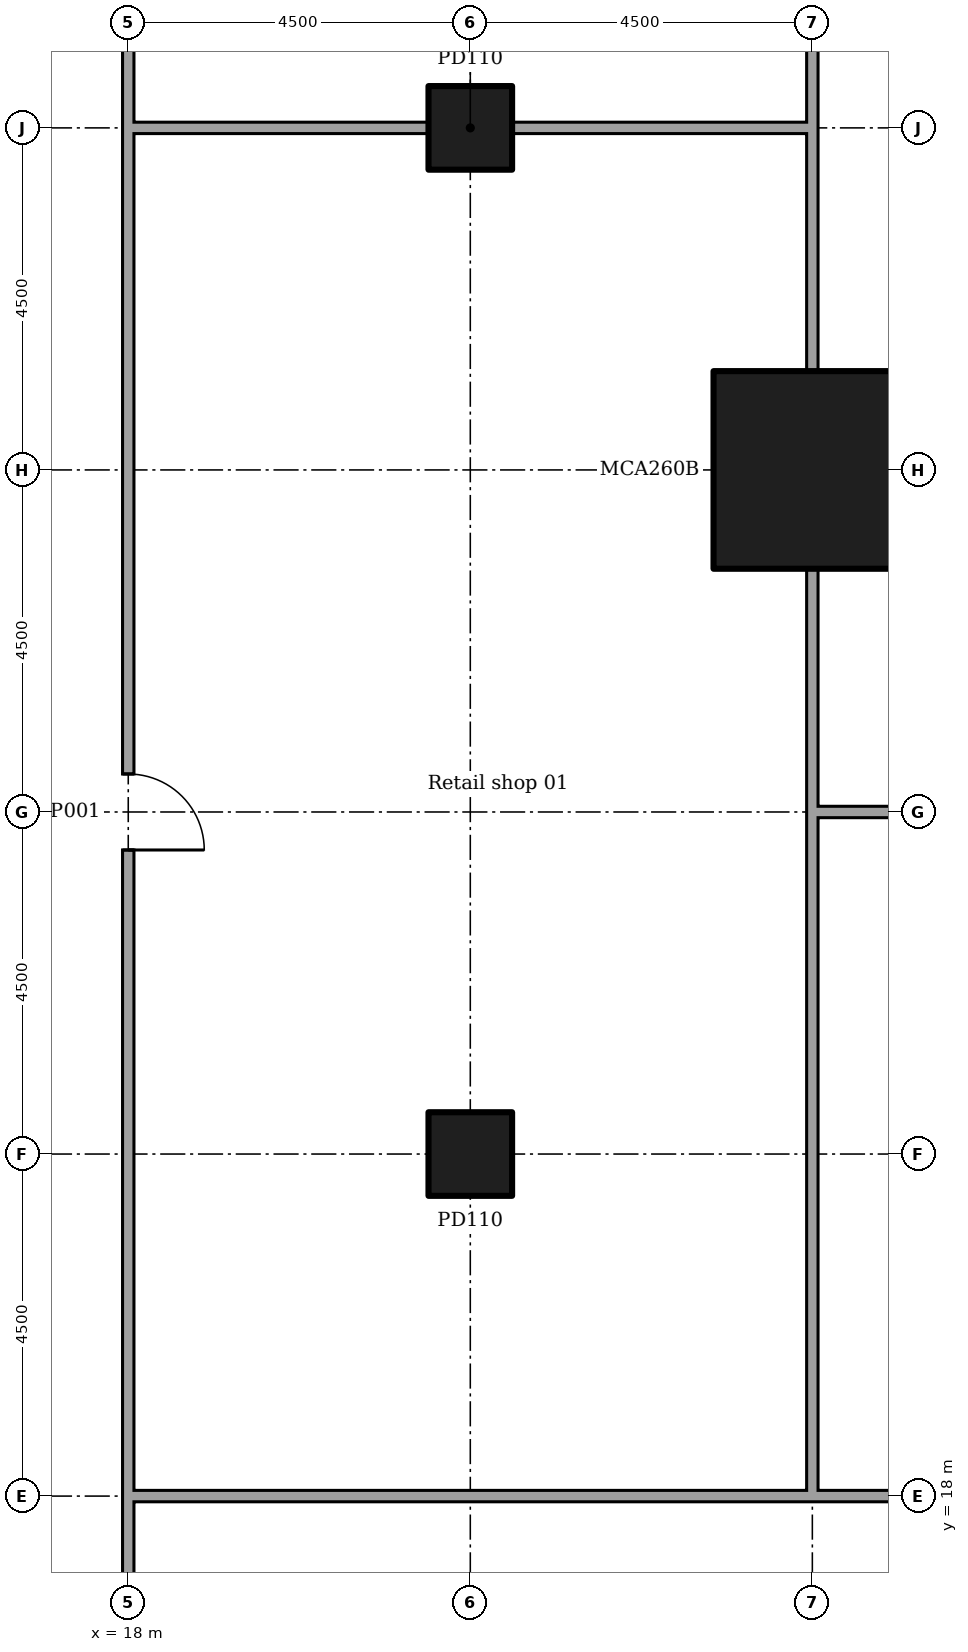
"""IFC4 building model, lengths in metres.
Left out: names, types, materials, properties, quantities, classifications, styles, units other than length and angle.
Written with IfcOpenShell. Run it as: python <this file> out.ifc"""

import sys

from ifc_helpers import new_model, si_unit, direction, frame, frame_2d, origin, origin_2d, place, context, subcontext, project, spatial, rectangle, extrude, element, fill, save


model = new_model("IFC4")
c1 = context("Model", 3, precision=1e-05, world=origin(), true_north=direction((0.0, 1.0)))
c2 = subcontext(c1, "Body", "Model", "MODEL_VIEW")
j1 = project(units=[si_unit("LENGTHUNIT", "METRE"), si_unit("PLANEANGLEUNIT", "RADIAN")], contexts=[c1])
p1 = place(None, origin())
s1 = spatial("IfcSite", under=j1, at=p1, CompositionType="ELEMENT")
p2 = place(p1, origin())
s2 = spatial("IfcBuilding", under=s1, at=p2, CompositionType="ELEMENT")
p3 = place(p2, frame((0.0, 0.0, 6.0)))
s3 = spatial("IfcBuildingStorey", under=s2, at=p3, CompositionType="ELEMENT", Elevation=6.0)
p4 = place(p3, frame((27.0, 31.5, 0.0)))
e1 = element("IfcColumn", 1, at=p4, inside=s3, PredefinedType="COLUMN", context=c2, shape_type="SweptSolid", body=[
    extrude(rectangle(XDim=2.6, YDim=2.6, at=origin_2d()), origin(), (0.0, 0.0, 1.0), 5.5),
])
for number, where in (
    (2, (22.5, 22.5, 0.0)),
    (3, (22.5, 36.0, 0.0)),
):
    element("IfcColumn", number, at=place(p3, frame(where)), inside=s3, PredefinedType="COLUMN", context=c2, shape_type="SweptSolid", body=[
        extrude(rectangle(XDim=1.1, YDim=1.1, at=origin_2d()), origin(), (0.0, 0.0, 1.0), 5.5),
    ])
p5 = place(p3, frame((18.0, 9.3, 0.0), z_axis=(0.0, 0.0, 1.0), x_axis=(0.0, 1.0, 0.0)))
e4 = element("IfcWall", 4, at=p5, inside=s3, PredefinedType="PARTITIONING", context=c2, shape_type="SweptSolid", body=[
    extrude(rectangle(XDim=8.775, YDim=0.15, at=frame_2d((4.387, 0.0))), origin(), (0.0, 0.0, 1.0), 5.05),
])
p6 = place(p5, frame((3.45, 0.0, 0.0)))
e5 = element("IfcOpeningElement", 5, at=p6, cuts=e4, PredefinedType="OPENING", context=c2, shape_type="SweptSolid", body=[
    extrude(rectangle(XDim=1.8, YDim=2.1, at=frame_2d((0.9, 1.05))), frame((0.0, 0.085, 0.0), z_axis=(0.0, -1.0, 0.0), x_axis=(1.0, 0.0, 0.0)), (0.0, 0.0, 1.0), 0.17),
])
p7 = place(p3, frame((18.0, 18.0, 0.0), z_axis=(0.0, 0.0, 1.0), x_axis=(0.0, 1.0, 0.0)))
e6 = element("IfcWall", 6, at=p7, inside=s3, PredefinedType="PARTITIONING", context=c2, shape_type="SweptSolid", body=[
    extrude(rectangle(XDim=18.075, YDim=0.15, at=frame_2d((9.038, 0.0))), origin(), (0.0, 0.0, 1.0), 5.05),
])
p8 = place(p7, frame((8.5, 0.0, 0.0)))
e7 = element("IfcOpeningElement", 7, at=p8, cuts=e6, PredefinedType="OPENING", context=c2, shape_type="SweptSolid", body=[
    extrude(rectangle(XDim=1.0, YDim=2.1, at=frame_2d((0.5, 1.05))), frame((0.0, 0.085, 0.0), z_axis=(0.0, -1.0, 0.0), x_axis=(1.0, 0.0, 0.0)), (0.0, 0.0, 1.0), 0.17),
])
p9 = place(p3, frame((18.0, 36.0, 0.0), z_axis=(0.0, 0.0, 1.0), x_axis=(0.0, 1.0, 0.0)))
e8 = element("IfcWall", 8, at=p9, inside=s3, PredefinedType="PARTITIONING", context=c2, shape_type="SweptSolid", body=[
    extrude(rectangle(XDim=18.075, YDim=0.15, at=frame_2d((9.038, 0.0))), origin(), (0.0, 0.0, 1.0), 5.05),
])
p10 = place(p9, frame((8.5, 0.0, 0.0)))
e9 = element("IfcOpeningElement", 9, at=p10, cuts=e8, PredefinedType="OPENING", context=c2, shape_type="SweptSolid", body=[
    extrude(rectangle(XDim=1.0, YDim=2.1, at=frame_2d((0.5, 1.05))), frame((0.0, 0.085, 0.0), z_axis=(0.0, -1.0, 0.0), x_axis=(1.0, 0.0, 0.0)), (0.0, 0.0, 1.0), 0.17),
])
p11 = place(p3, frame((18.075, 18.0, 0.0)))
e10 = element("IfcWall", 10, at=p11, inside=s3, PredefinedType="PARTITIONING", context=c2, shape_type="SweptSolid", body=[
    extrude(rectangle(XDim=9.0, YDim=0.15, at=frame_2d((4.5, 0.0))), origin(), (0.0, 0.0, 1.0), 5.05),
])
p12 = place(p3, frame((27.0, 18.0, 0.0)))
e11 = element("IfcWall", 11, at=p12, inside=s3, PredefinedType="PARTITIONING", context=c2, shape_type="SweptSolid", body=[
    extrude(rectangle(XDim=18.075, YDim=0.15, at=frame_2d((9.038, 0.0))), origin(), (0.0, 0.0, 1.0), 5.05),
])
p13 = place(p12, frame((8.5, 0.0, 0.0)))
e12 = element("IfcOpeningElement", 12, at=p13, cuts=e11, PredefinedType="OPENING", context=c2, shape_type="SweptSolid", body=[
    extrude(rectangle(XDim=1.0, YDim=2.1, at=frame_2d((0.5, 1.05))), frame((0.0, 0.085, 0.0), z_axis=(0.0, -1.0, 0.0), x_axis=(1.0, 0.0, 0.0)), (0.0, 0.0, 1.0), 0.17),
])
p14 = place(p3, frame((18.075, 36.0, 0.0)))
e13 = element("IfcWall", 13, at=p14, inside=s3, PredefinedType="PARTITIONING", context=c2, shape_type="SweptSolid", body=[
    extrude(rectangle(XDim=3.88, YDim=0.15, at=frame_2d((1.94, 0.0))), origin(), (0.0, 0.0, 1.0), 5.05),
])
p15 = place(p3, frame((23.045, 36.0, 0.0)))
e14 = element("IfcWall", 14, at=p15, inside=s3, PredefinedType="PARTITIONING", context=c2, shape_type="SweptSolid", body=[
    extrude(rectangle(XDim=4.03, YDim=0.15, at=frame_2d((2.015, 0.0))), origin(), (0.0, 0.0, 1.0), 5.05),
])
p16 = place(p3, frame((27.0, 18.075, 0.0), z_axis=(0.0, 0.0, 1.0), x_axis=(0.0, 1.0, 0.0)))
e15 = element("IfcWall", 15, at=p16, inside=s3, PredefinedType="PARTITIONING", context=c2, shape_type="SweptSolid", body=[
    extrude(rectangle(XDim=9.0, YDim=0.15, at=frame_2d((4.5, 0.0))), origin(), (0.0, 0.0, 1.0), 5.05),
])
p17 = place(p3, frame((27.0, 27.0, 0.0), z_axis=(0.0, 0.0, 1.0), x_axis=(0.0, 1.0, 0.0)))
e16 = element("IfcWall", 16, at=p17, inside=s3, PredefinedType="PARTITIONING", context=c2, shape_type="SweptSolid", body=[
    extrude(rectangle(XDim=3.205, YDim=0.15, at=frame_2d((1.603, 0.0))), origin(), (0.0, 0.0, 1.0), 5.05),
])
p18 = place(p3, frame((27.0, 32.795, 0.0), z_axis=(0.0, 0.0, 1.0), x_axis=(0.0, 1.0, 0.0)))
e17 = element("IfcWall", 17, at=p18, inside=s3, PredefinedType="PARTITIONING", context=c2, shape_type="SweptSolid", body=[
    extrude(rectangle(XDim=3.13, YDim=0.15, at=frame_2d((1.565, 0.0))), origin(), (0.0, 0.0, 1.0), 5.05),
])
p19 = place(p3, frame((27.0, 36.0, 0.0), z_axis=(0.0, 0.0, 1.0), x_axis=(0.0, 1.0, 0.0)))
e18 = element("IfcWall", 18, at=p19, inside=s3, PredefinedType="PARTITIONING", context=c2, shape_type="SweptSolid", body=[
    extrude(rectangle(XDim=7.705, YDim=0.15, at=frame_2d((3.853, 0.0))), origin(), (0.0, 0.0, 1.0), 5.05),
])
p20 = place(p3, frame((27.075, 27.0, 0.0)))
e19 = element("IfcWall", 19, at=p20, inside=s3, PredefinedType="PARTITIONING", context=c2, shape_type="SweptSolid", body=[
    extrude(rectangle(XDim=3.13, YDim=0.15, at=frame_2d((1.565, 0.0))), origin(), (0.0, 0.0, 1.0), 5.05),
])
p21 = place(p8, frame((1.0, 0.0, 0.0), x_axis=(-1.0, 0.0, 0.0)))
e20 = element("IfcDoor", 20, at=p21, inside=s3, OperationType="SINGLE_SWING_LEFT", PredefinedType="DOOR", context=c2, shape_type="SweptSolid", body=[
    extrude(rectangle(XDim=1.0, YDim=2.1, at=frame_2d((0.5, 1.05))), frame((0.0, 0.025, 0.0), z_axis=(0.0, -1.0, 0.0), x_axis=(1.0, 0.0, 0.0)), (0.0, 0.0, 1.0), 0.05),
])
fill(e7, e20)
save(model, sys.argv[1])
